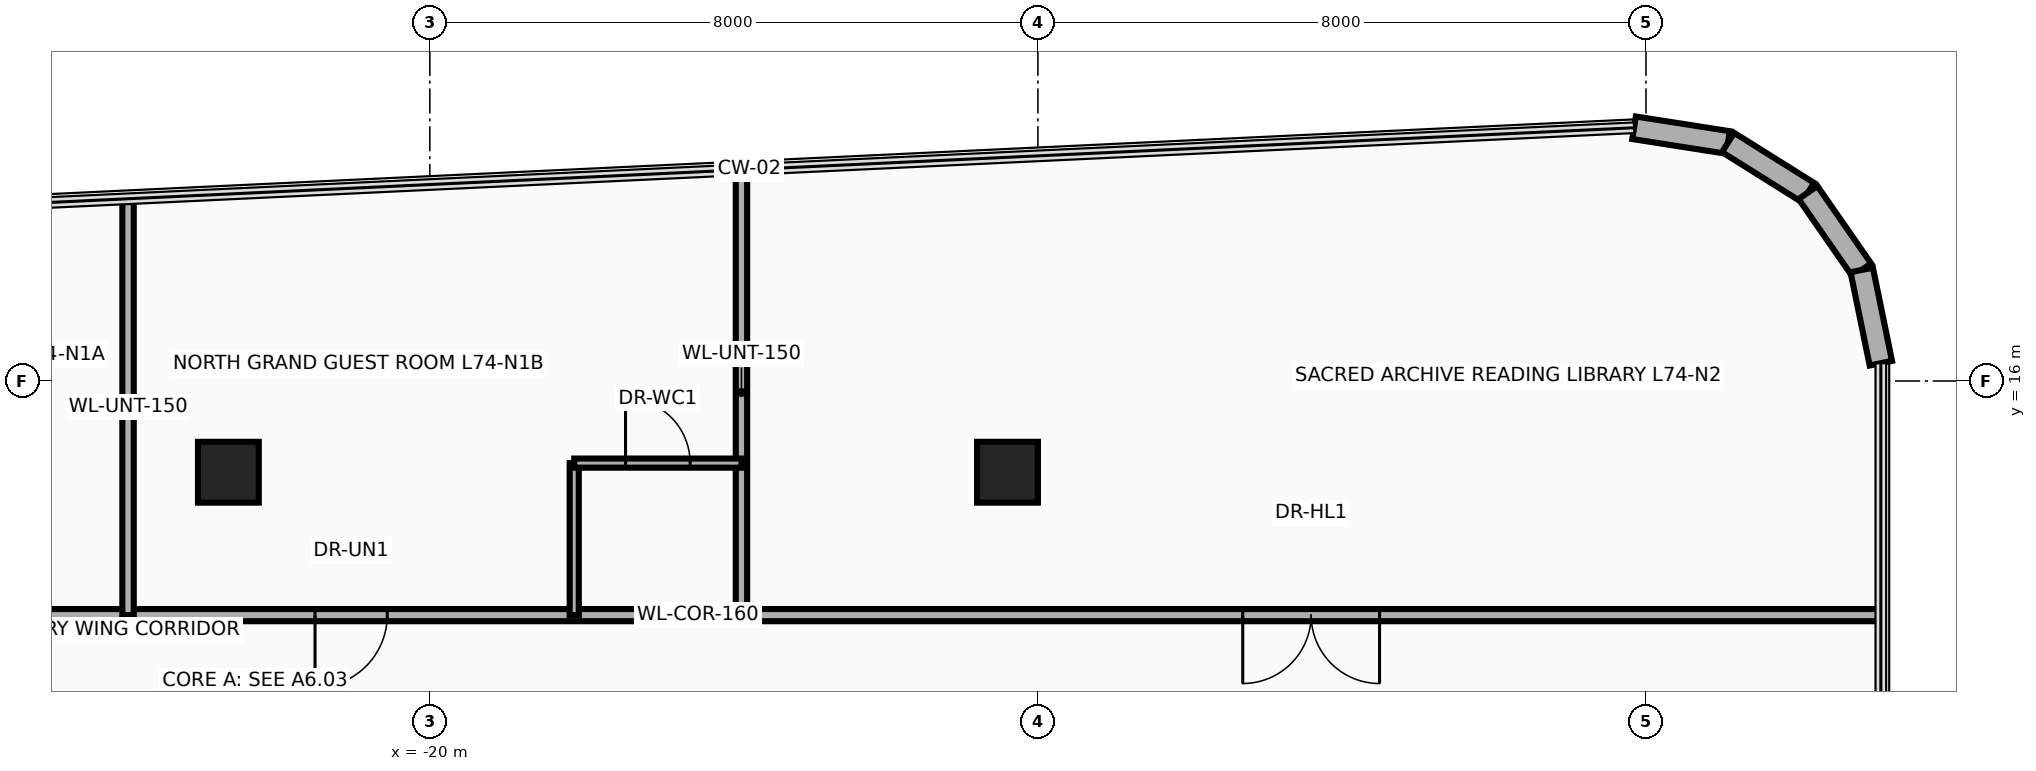
"""IFC4 building model, lengths in metres.
Left out: names, types, materials, properties, quantities, classifications, styles, units other than length and angle.
Written with IfcOpenShell. Run it as: python <this file> out.ifc"""

import sys

from ifc_helpers import new_model, si_unit, direction, frame, frame_2d, origin, origin_2d, place, context, subcontext, project, spatial, rectangle, extrude, source, transform, mapped, element, fill, save


model = new_model("IFC4")
c1 = context("Model", 3, precision=1e-05, world=origin(), true_north=direction((0.0, 1.0)))
c2 = subcontext(c1, "Body", "Model", "MODEL_VIEW")
j1 = project(units=[si_unit("LENGTHUNIT", "METRE"), si_unit("PLANEANGLEUNIT", "RADIAN")], contexts=[c1])
p1 = place(None, origin())
s1 = spatial("IfcSite", under=j1, at=p1, CompositionType="ELEMENT")
p2 = place(p1, origin())
s2 = spatial("IfcBuilding", under=s1, at=p2, CompositionType="ELEMENT")
p3 = place(p2, frame((0.0, 0.0, 283.5)))
s3 = spatial("IfcBuildingStorey", under=s2, at=p3, CompositionType="ELEMENT", Elevation=283.5)
m1 = source(origin(), c2, "Body", "SweptSolid", [
    extrude(rectangle(XDim=0.8, YDim=0.8, at=origin_2d()), origin(), (0.0, 0.0, 1.0), 3.5),
])
for number, where, z_axis, x_axis in (
    (1, (-22.65, 14.8, 0.0), (0.0, 0.0, 1.0), (1.0, 0.0, 0.0)),
    (2, (-12.4, 14.8, 0.0), (0.0, 0.0, 1.0), (1.0, 0.0, 0.0)),
):
    element("IfcColumn", number, at=place(p3, frame(where, z_axis=z_axis, x_axis=x_axis)), inside=s3, PredefinedType="COLUMN", context=c2, shape_type="MappedRepresentation", body=[
        mapped(m1, transform((0.0, 0.0, 0.0), x_axis=(1.0, 0.0, 0.0), y_axis=(0.0, 1.0, 0.0), z_axis=(0.0, 0.0, 1.0), scale=1.0)),
    ])
p4 = place(p3, frame((-4.157, 19.332, 0.0), z_axis=(0.0, 0.0, 1.0), x_axis=(0.987969236552, -0.15465053387, 0.0)))
e3 = element("IfcWall", 3, at=p4, inside=s3, PredefinedType="SOLIDWALL", context=c2, shape_type="SweptSolid", body=[
    extrude(rectangle(XDim=1.252, YDim=0.3, at=frame_2d((0.626, 0.0))), origin(), (0.0, 0.0, 1.0), 3.26),
])
for number, where, z_axis, x_axis in (
    (4, (-2.92, 19.138, 0.0), (0.0, 0.0, 1.0), (0.847, -0.531, 0.0)),
    (5, (-1.869, 18.48, 0.0), (0.0, 0.0, 1.0), (0.57, -0.822, 0.0)),
):
    element("IfcWall", number, at=place(p3, frame(where, z_axis=z_axis, x_axis=x_axis)), inside=s3, PredefinedType="SOLIDWALL", context=c2, shape_type="SweptSolid", body=[
        extrude(rectangle(XDim=1.24, YDim=0.3, at=frame_2d((0.62, 0.0))), origin(), (0.0, 0.0, 1.0), 3.26),
    ])
p5 = place(p3, frame((-1.161, 17.461, 0.0), z_axis=(0.0, 0.0, 1.0), x_axis=(0.20087696073, -0.979616479367, 0.0)))
e6 = element("IfcWall", 6, at=p5, inside=s3, PredefinedType="SOLIDWALL", context=c2, shape_type="SweptSolid", body=[
    extrude(rectangle(XDim=1.252, YDim=0.3, at=frame_2d((0.626, 0.0))), origin(), (0.0, 0.0, 1.0), 3.26),
])
p6 = place(p3, frame((-32.04, 12.92, 0.0), z_axis=(0.0, 0.0, 1.0), x_axis=(1.0, 0.0, 0.0)))
e7 = element("IfcWall", 7, at=p6, inside=s3, PredefinedType="PARTITIONING", context=c2, shape_type="SweptSolid", body=[
    extrude(rectangle(XDim=31.13, YDim=0.16, at=frame_2d((15.565, 0.0))), origin(), (0.0, 0.0, 1.0), 2.634),
])
p7 = place(p6, frame((3.56, 0.0, 0.0)))
e8 = element("IfcOpeningElement", 8, at=p7, cuts=e7, PredefinedType="OPENING", context=c2, shape_type="SweptSolid", body=[
    extrude(rectangle(XDim=0.95, YDim=2.15, at=frame_2d((0.475, 1.075))), frame((0.0, 0.095, 0.0), z_axis=(0.0, -1.0, 0.0), x_axis=(1.0, 0.0, 0.0)), (0.0, 0.0, 1.0), 0.19),
])
p8 = place(p6, frame((10.53, 0.0, 0.0)))
e9 = element("IfcOpeningElement", 9, at=p8, cuts=e7, PredefinedType="OPENING", context=c2, shape_type="SweptSolid", body=[
    extrude(rectangle(XDim=0.95, YDim=2.15, at=frame_2d((0.475, 1.075))), frame((0.0, 0.095, 0.0), z_axis=(0.0, -1.0, 0.0), x_axis=(1.0, 0.0, 0.0)), (0.0, 0.0, 1.0), 0.19),
])
p9 = place(p6, frame((22.735, 0.0, 0.0)))
e10 = element("IfcOpeningElement", 10, at=p9, cuts=e7, PredefinedType="OPENING", context=c2, shape_type="SweptSolid", body=[
    extrude(rectangle(XDim=1.8, YDim=2.15, at=frame_2d((0.9, 1.075))), frame((0.0, 0.095, 0.0), z_axis=(0.0, -1.0, 0.0), x_axis=(1.0, 0.0, 0.0)), (0.0, 0.0, 1.0), 0.19),
])
p10 = place(p3, frame((-15.9, 12.92, 0.0), z_axis=(0.0, 0.0, 1.0), x_axis=(0.0, 1.0, 0.0)))
e11 = element("IfcWall", 11, at=p10, inside=s3, PredefinedType="PARTITIONING", context=c2, shape_type="SweptSolid", body=[
    extrude(rectangle(XDim=5.858, YDim=0.15, at=frame_2d((2.929, 0.0))), origin(), (0.0, 0.0, 1.0), 2.623),
])
p11 = place(p3, frame((-23.97, 12.92, 0.0), z_axis=(0.0, 0.0, 1.0), x_axis=(0.0, 1.0, 0.0)))
e12 = element("IfcWall", 12, at=p11, inside=s3, PredefinedType="PARTITIONING", context=c2, shape_type="SweptSolid", body=[
    extrude(rectangle(XDim=5.478, YDim=0.15, at=frame_2d((2.739, 0.0))), origin(), (0.0, 0.0, 1.0), 2.623),
])
p12 = place(p3, frame((-18.1, 12.92, 0.0), z_axis=(0.0, 0.0, 1.0), x_axis=(0.0, 1.0, 0.0)))
e13 = element("IfcWall", 13, at=p12, inside=s3, PredefinedType="PARTITIONING", context=c2, shape_type="SweptSolid", body=[
    extrude(rectangle(XDim=2.0, YDim=0.12, at=frame_2d((1.0, 0.0))), origin(), (0.0, 0.0, 1.0), 2.623),
])
p13 = place(p3, frame((-18.1, 14.92, 0.0), z_axis=(0.0, 0.0, 1.0), x_axis=(1.0, 0.0, 0.0)))
e14 = element("IfcWall", 14, at=p13, inside=s3, PredefinedType="PARTITIONING", context=c2, shape_type="SweptSolid", body=[
    extrude(rectangle(XDim=2.2, YDim=0.12, at=frame_2d((1.1, 0.0))), origin(), (0.0, 0.0, 1.0), 2.623),
])
p14 = place(p13, frame((0.675, 0.0, 0.0)))
e15 = element("IfcOpeningElement", 15, at=p14, cuts=e14, PredefinedType="OPENING", context=c2, shape_type="SweptSolid", body=[
    extrude(rectangle(XDim=0.85, YDim=2.1, at=frame_2d((0.425, 1.05))), frame((0.0, 0.075, 0.0), z_axis=(0.0, -1.0, 0.0), x_axis=(1.0, 0.0, 0.0)), (0.0, 0.0, 1.0), 0.15),
])
p15 = place(p8, frame((0.95, 0.0, 0.0), z_axis=(0.0, 0.0, 1.0), x_axis=(-1.0, 0.0, 0.0)))
e16 = element("IfcDoor", 16, at=p15, inside=s3, OperationType="SINGLE_SWING_LEFT", PredefinedType="DOOR", context=c2, shape_type="SweptSolid", body=[
    extrude(rectangle(XDim=0.95, YDim=2.15, at=frame_2d((0.475, 1.075))), frame((0.0, 0.025, 0.0), z_axis=(0.0, -1.0, 0.0), x_axis=(1.0, 0.0, 0.0)), (0.0, 0.0, 1.0), 0.05),
])
fill(e9, e16)
p16 = place(p14, origin())
e17 = element("IfcDoor", 17, at=p16, inside=s3, OperationType="SINGLE_SWING_RIGHT", PredefinedType="DOOR", context=c2, shape_type="SweptSolid", body=[
    extrude(rectangle(XDim=0.85, YDim=2.1, at=frame_2d((0.425, 1.05))), frame((0.0, 0.025, 0.0), z_axis=(0.0, -1.0, 0.0), x_axis=(1.0, 0.0, 0.0)), (0.0, 0.0, 1.0), 0.05),
])
fill(e15, e17)
p17 = place(p9, frame((1.8, 0.0, 0.0), z_axis=(0.0, 0.0, 1.0), x_axis=(-1.0, 0.0, 0.0)))
e18 = element("IfcDoor", 18, at=p17, inside=s3, OperationType="DOUBLE_DOOR_SINGLE_SWING", PredefinedType="DOOR", context=c2, shape_type="SweptSolid", body=[
    extrude(rectangle(XDim=1.8, YDim=2.15, at=frame_2d((0.9, 1.075))), frame((0.0, 0.025, 0.0), z_axis=(0.0, -1.0, 0.0), x_axis=(1.0, 0.0, 0.0)), (0.0, 0.0, 1.0), 0.05),
])
fill(e10, e18)
save(model, sys.argv[1])
